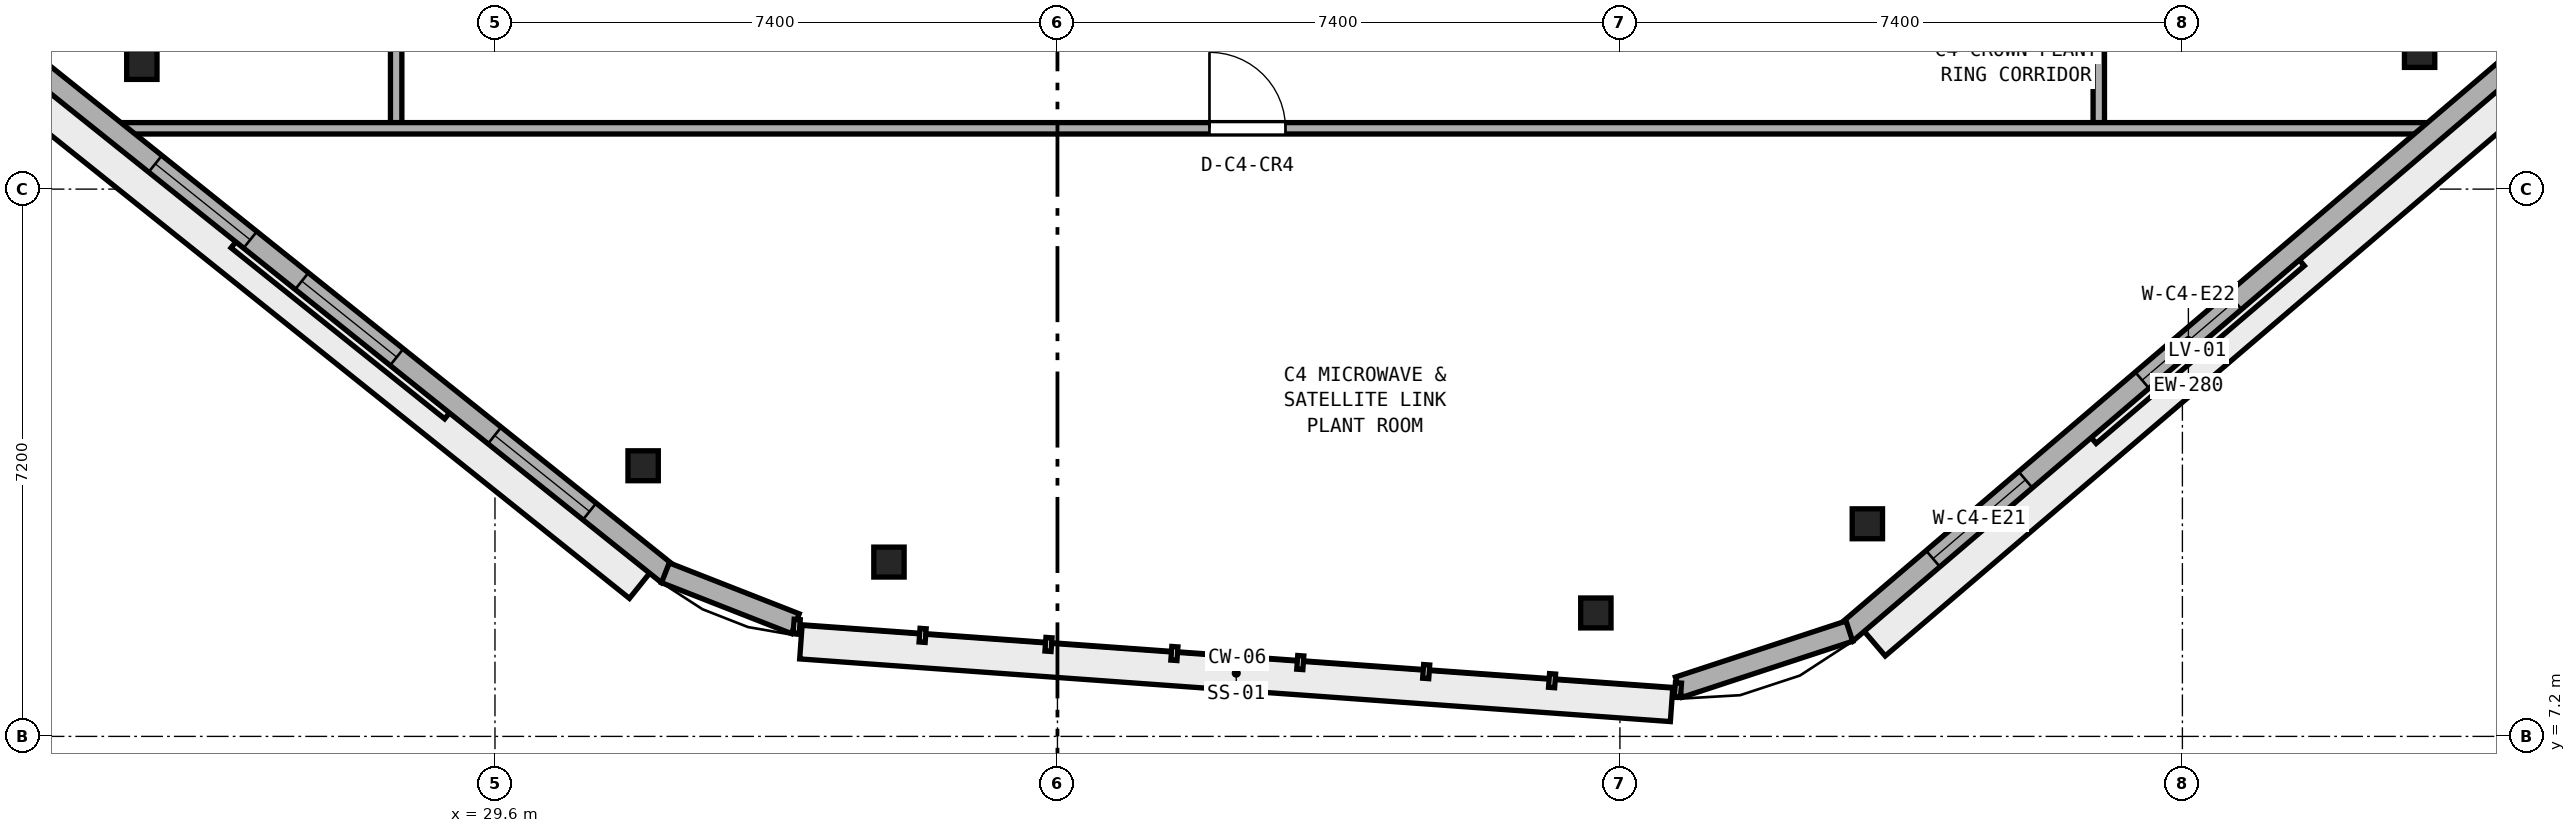
"""IFC4 building model, lengths in metres.
Left out: names, types, materials, properties, quantities, classifications, styles, units other than length and angle.
Written with IfcOpenShell. Run it as: python <this file> out.ifc"""

import sys

from ifc_helpers import new_model, si_unit, direction, frame, frame_2d, origin, origin_2d, place, context, subcontext, project, spatial, rectangle, i_section, extrude, element, fill, save


model = new_model("IFC4")
c1 = context("Model", 3, precision=1e-05, world=origin(), true_north=direction((0.0, 1.0)))
c2 = subcontext(c1, "Body", "Model", "MODEL_VIEW")
j1 = project(units=[si_unit("LENGTHUNIT", "METRE"), si_unit("PLANEANGLEUNIT", "RADIAN")], contexts=[c1])
p1 = place(None, origin())
s1 = spatial("IfcSite", under=j1, at=p1, CompositionType="ELEMENT")
p2 = place(p1, origin())
s2 = spatial("IfcBuilding", under=s1, at=p2, CompositionType="ELEMENT")
p3 = place(p2, frame((0.0, 0.0, 325.4)))
s3 = spatial("IfcBuildingStorey", under=s2, at=p3, CompositionType="ELEMENT", Elevation=325.4)
for number, where, z_axis, x_axis in (
    (1, (34.783, 9.493, 0.0), (0.0, 0.0, 1.0), (1.0, 0.0, 0.0)),
    (2, (44.083, 8.824, 0.0), (0.0, 0.0, 1.0), (1.0, 0.0, 0.0)),
    (3, (47.655, 9.997, 0.0), (0.0, 0.0, 1.0), (1.0, 0.0, 0.0)),
    (4, (54.921, 16.198, 0.0), (0.0, 0.0, 1.0), (1.0, 0.0, 0.0)),
    (5, (24.954, 16.04, 0.0), (0.0, 0.0, 1.0), (1.0, 0.0, 0.0)),
    (6, (31.549, 10.76, 0.0), (0.0, 0.0, 1.0), (1.0, 0.0, 0.0)),
):
    element("IfcColumn", number, at=place(p3, frame(where, z_axis=z_axis, x_axis=x_axis)), inside=s3, PredefinedType="COLUMN", context=c2, shape_type="SweptSolid", body=[
        extrude(i_section(OverallWidth=0.399, OverallDepth=0.394, WebThickness=0.023, FlangeThickness=0.037, at=origin_2d()), origin(), (0.0, 0.0, 1.0), 4.0),
    ])
p4 = place(p3, frame((50.7, 15.2, 0.0), z_axis=(0.0, 0.0, 1.0), x_axis=(0.0, 1.0, 0.0)))
e7 = element("IfcWall", 7, at=p4, inside=s3, PredefinedType="PARTITIONING", context=c2, shape_type="SweptSolid", body=[
    extrude(rectangle(XDim=20.0, YDim=0.15, at=frame_2d((10.0, 0.0))), origin(), (0.0, 0.0, 1.0), 3.72),
])
p5 = place(p4, frame((9.5, 0.0, 0.0)))
e8 = element("IfcOpeningElement", 8, at=p5, cuts=e7, PredefinedType="OPENING", context=c2, shape_type="SweptSolid", body=[
    extrude(rectangle(XDim=1.0, YDim=2.12, at=frame_2d((0.5, 1.06))), frame((0.0, 0.085, 0.0), z_axis=(0.0, -1.0, 0.0), x_axis=(1.0, 0.0, 0.0)), (0.0, 0.0, 1.0), 0.17),
])
p6 = place(p3, frame((28.3, 15.2, 0.0), z_axis=(0.0, 0.0, 1.0), x_axis=(0.0, 1.0, 0.0)))
e9 = element("IfcWall", 9, at=p6, inside=s3, PredefinedType="PARTITIONING", context=c2, shape_type="SweptSolid", body=[
    extrude(rectangle(XDim=20.0, YDim=0.15, at=frame_2d((10.0, 0.0))), origin(), (0.0, 0.0, 1.0), 2.37),
])
p7 = place(p6, frame((9.5, 0.0, 0.0)))
e10 = element("IfcOpeningElement", 10, at=p7, cuts=e9, PredefinedType="OPENING", context=c2, shape_type="SweptSolid", body=[
    extrude(rectangle(XDim=1.0, YDim=2.12, at=frame_2d((0.5, 1.06))), frame((0.0, 0.085, 0.0), z_axis=(0.0, -1.0, 0.0), x_axis=(1.0, 0.0, 0.0)), (0.0, 0.0, 1.0), 0.17),
])
p8 = place(p3, frame((24.464, 15.2, 0.0), z_axis=(0.0, 0.0, 1.0), x_axis=(1.0, 0.0, 0.0)))
e11 = element("IfcWall", 11, at=p8, inside=s3, PredefinedType="PARTITIONING", context=c2, shape_type="SweptSolid", body=[
    extrude(rectangle(XDim=30.765, YDim=0.15, at=frame_2d((15.383, 0.0))), origin(), (0.0, 0.0, 1.0), 3.72),
])
p9 = place(p8, frame((14.536, 0.0, 0.0)))
e12 = element("IfcOpeningElement", 12, at=p9, cuts=e11, PredefinedType="OPENING", context=c2, shape_type="SweptSolid", body=[
    extrude(rectangle(XDim=1.0, YDim=2.12, at=frame_2d((0.5, 1.06))), frame((0.0, 0.085, 0.0), z_axis=(0.0, -1.0, 0.0), x_axis=(1.0, 0.0, 0.0)), (0.0, 0.0, 1.0), 0.17),
])
p10 = place(p3, frame((47.371, 8.558, 0.0), z_axis=(0.0, 0.0, 1.0), x_axis=(0.760637685394, 0.649176641261, 0.0)))
e13 = element("IfcWall", 13, at=p10, inside=s3, PredefinedType="STANDARD", context=c2, shape_type="SweptSolid", body=[
    extrude(rectangle(XDim=11.852, YDim=0.28, at=frame_2d((5.926, 0.0))), origin(), (0.0, 0.0, 1.0), 3.72),
])
p11 = place(p10, frame((1.509, 0.0, 0.9)))
e14 = element("IfcOpeningElement", 14, at=p11, cuts=e13, PredefinedType="OPENING", context=c2, shape_type="SweptSolid", body=[
    extrude(rectangle(XDim=1.6, YDim=1.45, at=frame_2d((0.8, 0.725))), frame((0.0, 0.15, 0.0), z_axis=(0.0, -1.0, 0.0), x_axis=(1.0, 0.0, 0.0)), (0.0, 0.0, 1.0), 0.3),
])
p12 = place(p10, frame((5.126, 0.0, 0.9)))
e15 = element("IfcOpeningElement", 15, at=p12, cuts=e13, PredefinedType="OPENING", context=c2, shape_type="SweptSolid", body=[
    extrude(rectangle(XDim=1.6, YDim=1.45, at=frame_2d((0.8, 0.725))), frame((0.0, 0.15, 0.0), z_axis=(0.0, -1.0, 0.0), x_axis=(1.0, 0.0, 0.0)), (0.0, 0.0, 1.0), 0.3),
])
p13 = place(p3, frame((23.488, 16.049, 0.0), z_axis=(0.0, 0.0, 1.0), x_axis=(0.780662671576, -0.624952632771, 0.0)))
e16 = element("IfcWall", 16, at=p13, inside=s3, PredefinedType="STANDARD", context=c2, shape_type="SweptSolid", body=[
    extrude(rectangle(XDim=10.748, YDim=0.28, at=frame_2d((5.374, 0.0))), origin(), (0.0, 0.0, 1.0), 3.72),
])
p14 = place(p13, frame((2.105, 0.0, 0.9)))
e17 = element("IfcOpeningElement", 17, at=p14, cuts=e16, PredefinedType="OPENING", context=c2, shape_type="SweptSolid", body=[
    extrude(rectangle(XDim=1.6, YDim=1.45, at=frame_2d((0.8, 0.725))), frame((0.0, 0.15, 0.0), z_axis=(0.0, -1.0, 0.0), x_axis=(1.0, 0.0, 0.0)), (0.0, 0.0, 1.0), 0.3),
])
p15 = place(p13, frame((4.574, 0.0, 0.9)))
e18 = element("IfcOpeningElement", 18, at=p15, cuts=e16, PredefinedType="OPENING", context=c2, shape_type="SweptSolid", body=[
    extrude(rectangle(XDim=1.6, YDim=1.45, at=frame_2d((0.8, 0.725))), frame((0.0, 0.15, 0.0), z_axis=(0.0, -1.0, 0.0), x_axis=(1.0, 0.0, 0.0)), (0.0, 0.0, 1.0), 0.3),
])
p16 = place(p13, frame((7.823, 0.0, 0.9)))
e19 = element("IfcOpeningElement", 19, at=p16, cuts=e16, PredefinedType="OPENING", context=c2, shape_type="SweptSolid", body=[
    extrude(rectangle(XDim=1.6, YDim=1.45, at=frame_2d((0.8, 0.725))), frame((0.0, 0.15, 0.0), z_axis=(0.0, -1.0, 0.0), x_axis=(1.0, 0.0, 0.0)), (0.0, 0.0, 1.0), 0.3),
])
p17 = place(p3, frame((45.173, 7.847, 0.0), z_axis=(0.0, 0.0, 1.0), x_axis=(0.950058441306, 0.312072039925, 0.0)))
e20 = element("IfcWall", 20, at=p17, inside=s3, PredefinedType="STANDARD", context=c2, shape_type="SweptSolid", body=[
    extrude(rectangle(XDim=2.363, YDim=0.28, at=frame_2d((1.182, 0.0))), origin(), (0.0, 0.0, 1.0), 3.72),
])
p18 = place(p3, frame((31.842, 9.353, 0.0), z_axis=(0.0, 0.0, 1.0), x_axis=(0.93107594499, -0.364825416686, 0.0)))
e21 = element("IfcWall", 21, at=p18, inside=s3, PredefinedType="STANDARD", context=c2, shape_type="SweptSolid", body=[
    extrude(rectangle(XDim=1.836, YDim=0.28, at=frame_2d((0.918, 0.0))), origin(), (0.0, 0.0, 1.0), 3.72),
])
p19 = place(p9, origin())
e22 = element("IfcDoor", 22, at=p19, inside=s3, OperationType="SINGLE_SWING_LEFT", PredefinedType="DOOR", context=c2, shape_type="SweptSolid", body=[
    extrude(rectangle(XDim=1.0, YDim=2.12, at=frame_2d((0.5, 1.06))), frame((0.0, 0.025, 0.0), z_axis=(0.0, -1.0, 0.0), x_axis=(1.0, 0.0, 0.0)), (0.0, 0.0, 1.0), 0.05),
])
fill(e12, e22)
p20 = place(p11, origin())
e23 = element("IfcWindow", 23, at=p20, inside=s3, PartitioningType="SINGLE_PANEL", PredefinedType="WINDOW", context=c2, shape_type="SweptSolid", body=[
    extrude(rectangle(XDim=1.6, YDim=1.45, at=frame_2d((0.8, 0.725))), frame((0.0, 0.03, 0.0), z_axis=(0.0, -1.0, 0.0), x_axis=(1.0, 0.0, 0.0)), (0.0, 0.0, 1.0), 0.06),
])
fill(e14, e23)
p21 = place(p12, origin())
e24 = element("IfcWindow", 24, at=p21, inside=s3, PartitioningType="SINGLE_PANEL", PredefinedType="WINDOW", context=c2, shape_type="SweptSolid", body=[
    extrude(rectangle(XDim=1.6, YDim=1.45, at=frame_2d((0.8, 0.725))), frame((0.0, 0.03, 0.0), z_axis=(0.0, -1.0, 0.0), x_axis=(1.0, 0.0, 0.0)), (0.0, 0.0, 1.0), 0.06),
])
fill(e15, e24)
p22 = place(p14, origin())
e25 = element("IfcWindow", 25, at=p22, inside=s3, PartitioningType="SINGLE_PANEL", PredefinedType="WINDOW", context=c2, shape_type="SweptSolid", body=[
    extrude(rectangle(XDim=1.6, YDim=1.45, at=frame_2d((0.8, 0.725))), frame((0.0, 0.03, 0.0), z_axis=(0.0, -1.0, 0.0), x_axis=(1.0, 0.0, 0.0)), (0.0, 0.0, 1.0), 0.06),
])
fill(e17, e25)
p23 = place(p15, origin())
e26 = element("IfcWindow", 26, at=p23, inside=s3, PartitioningType="SINGLE_PANEL", PredefinedType="WINDOW", context=c2, shape_type="SweptSolid", body=[
    extrude(rectangle(XDim=1.6, YDim=1.45, at=frame_2d((0.8, 0.725))), frame((0.0, 0.03, 0.0), z_axis=(0.0, -1.0, 0.0), x_axis=(1.0, 0.0, 0.0)), (0.0, 0.0, 1.0), 0.06),
])
fill(e18, e26)
p24 = place(p16, origin())
e27 = element("IfcWindow", 27, at=p24, inside=s3, PartitioningType="SINGLE_PANEL", PredefinedType="WINDOW", context=c2, shape_type="SweptSolid", body=[
    extrude(rectangle(XDim=1.6, YDim=1.45, at=frame_2d((0.8, 0.725))), frame((0.0, 0.03, 0.0), z_axis=(0.0, -1.0, 0.0), x_axis=(1.0, 0.0, 0.0)), (0.0, 0.0, 1.0), 0.06),
])
fill(e19, e27)
save(model, sys.argv[1])
